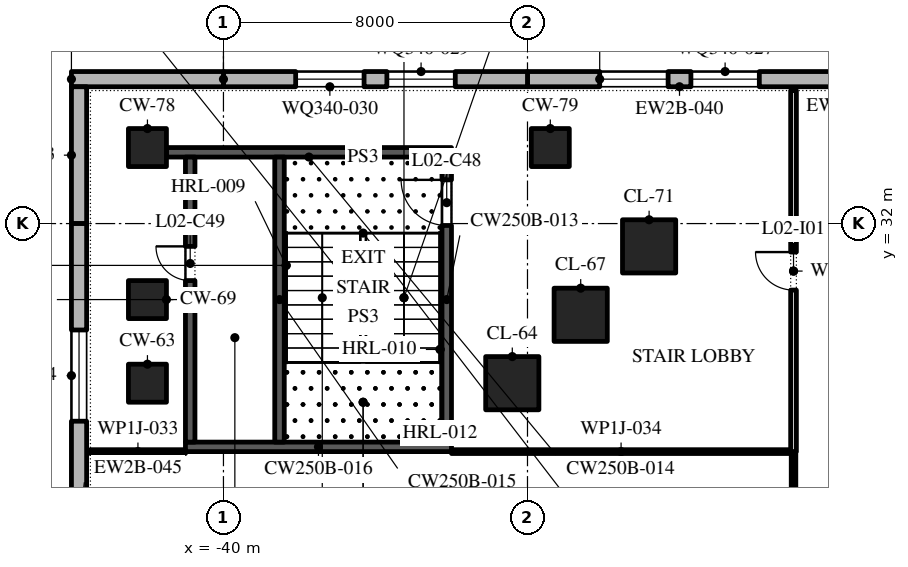
"""IFC4 building model, lengths in metres.
Left out: names, types, materials, properties, quantities, classifications, styles, units other than length and angle.
Written with IfcOpenShell. Run it as: python <this file> out.ifc"""

import sys

from ifc_helpers import new_model, si_unit, direction, frame, frame_2d, origin, origin_2d, place, context, subcontext, project, spatial, polyline, rectangle, outline, extrude, element, fill, save


model = new_model("IFC4")
c1 = context("Model", 3, precision=1e-05, world=origin(), true_north=direction((0.0, 1.0)))
c2 = subcontext(c1, "Body", "Model", "MODEL_VIEW")
j1 = project(units=[si_unit("LENGTHUNIT", "METRE"), si_unit("PLANEANGLEUNIT", "RADIAN")], contexts=[c1])
p1 = place(None, origin())
s1 = spatial("IfcSite", under=j1, at=p1, CompositionType="ELEMENT")
p2 = place(p1, origin())
s2 = spatial("IfcBuilding", under=s1, at=p2, CompositionType="ELEMENT")
p3 = place(p2, frame((0.0, 0.0, 14.0)))
s3 = spatial("IfcBuildingStorey", under=s2, at=p3, CompositionType="ELEMENT", Elevation=14.0)
p4 = place(p3, frame((-42.0, 27.8, 0.0), z_axis=(0.0, 0.0, 1.0), x_axis=(1.0, 0.0, 0.0)))
e1 = element("IfcColumn", 1, at=p4, inside=s3, PredefinedType="COLUMN", context=c2, shape_type="SweptSolid", body=[
    extrude(rectangle(XDim=1.0, YDim=1.0, at=origin_2d()), origin(), (0.0, 0.0, 1.0), 5.2),
])
for number, where, z_axis, x_axis in (
    (2, (-32.4, 27.8, 0.0), (0.0, 0.0, 1.0), (1.0, 0.0, 0.0)),
    (3, (-30.6, 29.6, 0.0), (0.0, 0.0, 1.0), (1.0, 0.0, 0.0)),
):
    element("IfcColumn", number, at=place(p3, frame(where, z_axis=z_axis, x_axis=x_axis)), inside=s3, PredefinedType="COLUMN", context=c2, shape_type="SweptSolid", body=[
        extrude(rectangle(XDim=1.4, YDim=1.4, at=origin_2d()), origin(), (0.0, 0.0, 1.0), 5.2),
    ])
p5 = place(p3, frame((-42.0, 30.0, 0.0), z_axis=(0.0, 0.0, 1.0), x_axis=(1.0, 0.0, 0.0)))
e4 = element("IfcColumn", 4, at=p5, inside=s3, PredefinedType="COLUMN", context=c2, shape_type="SweptSolid", body=[
    extrude(rectangle(XDim=1.0, YDim=1.0, at=origin_2d()), origin(), (0.0, 0.0, 1.0), 5.2),
])
p6 = place(p3, frame((-28.8, 31.4, 0.0), z_axis=(0.0, 0.0, 1.0), x_axis=(1.0, 0.0, 0.0)))
e5 = element("IfcColumn", 5, at=p6, inside=s3, PredefinedType="COLUMN", context=c2, shape_type="SweptSolid", body=[
    extrude(rectangle(XDim=1.4, YDim=1.4, at=origin_2d()), origin(), (0.0, 0.0, 1.0), 5.2),
])
for number, where, z_axis, x_axis in (
    (6, (-42.0, 34.0, 0.0), (0.0, 0.0, 1.0), (1.0, 0.0, 0.0)),
    (7, (-31.4, 34.0, 0.0), (0.0, 0.0, 1.0), (1.0, 0.0, 0.0)),
):
    element("IfcColumn", number, at=place(p3, frame(where, z_axis=z_axis, x_axis=x_axis)), inside=s3, PredefinedType="COLUMN", context=c2, shape_type="SweptSolid", body=[
        extrude(rectangle(XDim=1.0, YDim=1.0, at=origin_2d()), origin(), (0.0, 0.0, 1.0), 5.2),
    ])
p7 = place(p3, frame((-24.0, 35.8, 0.0), z_axis=(0.0, 0.0, 1.0), x_axis=(-1.0, 0.0, 0.0)))
e8 = element("IfcWall", 8, at=p7, inside=s3, PredefinedType="STANDARD", context=c2, shape_type="SweptSolid", body=[
    extrude(rectangle(XDim=8.0, YDim=0.4, at=frame_2d((4.0, 0.0))), origin(), (0.0, 0.0, 1.0), 4.9),
])
p8 = place(p7, frame((1.9, 0.0, 0.9)))
e9 = element("IfcOpeningElement", 9, at=p8, cuts=e8, PredefinedType="OPENING", context=c2, shape_type="SweptSolid", body=[
    extrude(outline(polyline([(0.0, 0.0), (1.8, 0.0), (1.8, 1.841), (1.785, 2.076), (1.739, 2.307), (1.663, 2.53), (1.559, 2.741), (1.428, 2.937), (1.273, 3.114), (1.096, 3.269), (0.9, 3.4), (0.704, 3.269), (0.527, 3.114), (0.372, 2.937), (0.241, 2.741), (0.137, 2.53), (0.061, 2.307), (0.015, 2.076), (0.0, 1.841), (0.0, 0.0)])), frame((0.0, 0.21, 0.0), z_axis=(0.0, -1.0, 0.0), x_axis=(1.0, 0.0, 0.0)), (0.0, 0.0, 1.0), 0.42),
])
p9 = place(p7, frame((4.3, 0.0, 0.9)))
e10 = element("IfcOpeningElement", 10, at=p9, cuts=e8, PredefinedType="OPENING", context=c2, shape_type="SweptSolid", body=[
    extrude(outline(polyline([(0.0, 0.0), (1.8, 0.0), (1.8, 1.841), (1.785, 2.076), (1.739, 2.307), (1.663, 2.53), (1.559, 2.741), (1.428, 2.937), (1.273, 3.114), (1.096, 3.269), (0.9, 3.4), (0.704, 3.269), (0.527, 3.114), (0.372, 2.937), (0.241, 2.741), (0.137, 2.53), (0.061, 2.307), (0.015, 2.076), (0.0, 1.841), (0.0, 0.0)])), frame((0.0, 0.21, 0.0), z_axis=(0.0, -1.0, 0.0), x_axis=(1.0, 0.0, 0.0)), (0.0, 0.0, 1.0), 0.42),
])
p10 = place(p3, frame((-32.0, 35.8, 0.0), z_axis=(0.0, 0.0, 1.0), x_axis=(-1.0, 0.0, 0.0)))
e11 = element("IfcWall", 11, at=p10, inside=s3, PredefinedType="STANDARD", context=c2, shape_type="SweptSolid", body=[
    extrude(rectangle(XDim=8.0, YDim=0.4, at=frame_2d((4.0, 0.0))), origin(), (0.0, 0.0, 1.0), 4.9),
])
p11 = place(p10, frame((1.9, 0.0, 0.9)))
e12 = element("IfcOpeningElement", 12, at=p11, cuts=e11, PredefinedType="OPENING", context=c2, shape_type="SweptSolid", body=[
    extrude(outline(polyline([(0.0, 0.0), (1.8, 0.0), (1.8, 1.841), (1.785, 2.076), (1.739, 2.307), (1.663, 2.53), (1.559, 2.741), (1.428, 2.937), (1.273, 3.114), (1.096, 3.269), (0.9, 3.4), (0.704, 3.269), (0.527, 3.114), (0.372, 2.937), (0.241, 2.741), (0.137, 2.53), (0.061, 2.307), (0.015, 2.076), (0.0, 1.841), (0.0, 0.0)])), frame((0.0, 0.21, 0.0), z_axis=(0.0, -1.0, 0.0), x_axis=(1.0, 0.0, 0.0)), (0.0, 0.0, 1.0), 0.42),
])
p12 = place(p10, frame((4.3, 0.0, 0.9)))
e13 = element("IfcOpeningElement", 13, at=p12, cuts=e11, PredefinedType="OPENING", context=c2, shape_type="SweptSolid", body=[
    extrude(outline(polyline([(0.0, 0.0), (1.8, 0.0), (1.8, 1.841), (1.785, 2.076), (1.739, 2.307), (1.663, 2.53), (1.559, 2.741), (1.428, 2.937), (1.273, 3.114), (1.096, 3.269), (0.9, 3.4), (0.704, 3.269), (0.527, 3.114), (0.372, 2.937), (0.241, 2.741), (0.137, 2.53), (0.061, 2.307), (0.015, 2.076), (0.0, 1.841), (0.0, 0.0)])), frame((0.0, 0.21, 0.0), z_axis=(0.0, -1.0, 0.0), x_axis=(1.0, 0.0, 0.0)), (0.0, 0.0, 1.0), 0.42),
])
p13 = place(p3, frame((-40.0, 35.8, 0.0), z_axis=(0.0, 0.0, 1.0), x_axis=(-1.0, 0.0, 0.0)))
e14 = element("IfcWall", 14, at=p13, inside=s3, PredefinedType="STANDARD", context=c2, shape_type="SweptSolid", body=[
    extrude(rectangle(XDim=4.0, YDim=0.4, at=frame_2d((2.0, 0.0))), origin(), (0.0, 0.0, 1.0), 4.9),
])
p14 = place(p3, frame((-43.8, 35.6, 0.0), z_axis=(0.0, 0.0, 1.0), x_axis=(0.0, -1.0, 0.0)))
e15 = element("IfcWall", 15, at=p14, inside=s3, PredefinedType="STANDARD", context=c2, shape_type="SweptSolid", body=[
    extrude(rectangle(XDim=3.6, YDim=0.4, at=frame_2d((1.8, 0.0))), origin(), (0.0, 0.0, 1.0), 4.9),
])
p15 = place(p3, frame((-43.8, 32.0, 0.0), z_axis=(0.0, 0.0, 1.0), x_axis=(0.0, -1.0, 0.0)))
e16 = element("IfcWall", 16, at=p15, inside=s3, PredefinedType="STANDARD", context=c2, shape_type="SweptSolid", body=[
    extrude(rectangle(XDim=8.0, YDim=0.4, at=frame_2d((4.0, 0.0))), origin(), (0.0, 0.0, 1.0), 4.9),
])
p16 = place(p15, frame((2.8, 0.0, 0.9)))
e17 = element("IfcOpeningElement", 17, at=p16, cuts=e16, PredefinedType="OPENING", context=c2, shape_type="SweptSolid", body=[
    extrude(outline(polyline([(0.0, 0.0), (2.4, 0.0), (2.4, 1.7), (2.379, 1.976), (2.315, 2.246), (2.212, 2.502), (2.07, 2.74), (1.893, 2.954), (1.686, 3.137), (1.453, 3.287), (1.2, 3.4), (0.947, 3.287), (0.714, 3.137), (0.507, 2.954), (0.33, 2.74), (0.188, 2.502), (0.084, 2.246), (0.021, 1.976), (0.0, 1.7), (0.0, 0.0)])), frame((0.0, 0.21, 0.0), z_axis=(0.0, -1.0, 0.0), x_axis=(1.0, 0.0, 0.0)), (0.0, 0.0, 1.0), 0.42),
])
p17 = place(p3, frame((-41.0, 26.125, 0.0), z_axis=(0.0, 0.0, 1.0), x_axis=(1.0, 0.0, 0.0)))
e18 = element("IfcWall", 18, at=p17, inside=s3, PredefinedType="SHEAR", context=c2, shape_type="SweptSolid", body=[
    extrude(rectangle(XDim=7.0, YDim=0.25, at=frame_2d((3.5, 0.0))), origin(), (0.0, 0.0, 1.0), 4.9),
])
p18 = place(p3, frame((-41.5, 33.875, 0.0), z_axis=(0.0, 0.0, 1.0), x_axis=(1.0, 0.0, 0.0)))
e19 = element("IfcWall", 19, at=p18, inside=s3, PredefinedType="SHEAR", context=c2, shape_type="SweptSolid", body=[
    extrude(rectangle(XDim=7.5, YDim=0.25, at=frame_2d((3.75, 0.0))), origin(), (0.0, 0.0, 1.0), 4.9),
])
p19 = place(p3, frame((-40.875, 26.25, 0.0), z_axis=(0.0, 0.0, 1.0), x_axis=(0.0, 1.0, 0.0)))
e20 = element("IfcWall", 20, at=p19, inside=s3, PredefinedType="SHEAR", context=c2, shape_type="SweptSolid", body=[
    extrude(rectangle(XDim=7.5, YDim=0.25, at=frame_2d((3.75, 0.0))), origin(), (0.0, 0.0, 1.0), 4.9),
])
p20 = place(p19, frame((4.25, 0.0, 0.0)))
e21 = element("IfcOpeningElement", 21, at=p20, cuts=e20, PredefinedType="OPENING", context=c2, shape_type="SweptSolid", body=[
    extrude(rectangle(XDim=0.9, YDim=2.1, at=frame_2d((0.45, 1.05))), frame((0.0, 0.135, 0.0), z_axis=(0.0, -1.0, 0.0), x_axis=(1.0, 0.0, 0.0)), (0.0, 0.0, 1.0), 0.27),
])
p21 = place(p3, frame((-34.125, 26.25, 0.0), z_axis=(0.0, 0.0, 1.0), x_axis=(0.0, 1.0, 0.0)))
e22 = element("IfcWall", 22, at=p21, inside=s3, PredefinedType="SHEAR", context=c2, shape_type="SweptSolid", body=[
    extrude(rectangle(XDim=7.5, YDim=0.25, at=frame_2d((3.75, 0.0))), origin(), (0.0, 0.0, 1.0), 4.9),
])
p22 = place(p21, frame((5.7, 0.0, 0.0)))
e23 = element("IfcOpeningElement", 23, at=p22, cuts=e22, PredefinedType="OPENING", context=c2, shape_type="SweptSolid", body=[
    extrude(rectangle(XDim=1.2, YDim=2.1, at=frame_2d((0.6, 1.05))), frame((0.0, 0.135, 0.0), z_axis=(0.0, -1.0, 0.0), x_axis=(1.0, 0.0, 0.0)), (0.0, 0.0, 1.0), 0.27),
])
p23 = place(p3, frame((-38.525, 26.25, 0.0), z_axis=(0.0, 0.0, 1.0), x_axis=(0.0, 1.0, 0.0)))
e24 = element("IfcWall", 24, at=p23, inside=s3, PredefinedType="SHEAR", context=c2, shape_type="SweptSolid", body=[
    extrude(rectangle(XDim=7.5, YDim=0.25, at=frame_2d((3.75, 0.0))), origin(), (0.0, 0.0, 1.0), 4.9),
])
p24 = place(p3, frame((-43.5, 26.0, 0.0), z_axis=(0.0, 0.0, 1.0), x_axis=(1.0, 0.0, 0.0)))
e25 = element("IfcWall", 25, at=p24, inside=s3, PredefinedType="PARTITIONING", context=c2, shape_type="SweptSolid", body=[
    extrude(rectangle(XDim=2.5, YDim=0.1, at=frame_2d((1.25, 0.0))), origin(), (0.0, 0.0, 1.0), 4.9),
])
p25 = place(p3, frame((-34.0, 26.0, 0.0), z_axis=(0.0, 0.0, 1.0), x_axis=(1.0, 0.0, 0.0)))
e26 = element("IfcWall", 26, at=p25, inside=s3, PredefinedType="PARTITIONING", context=c2, shape_type="SweptSolid", body=[
    extrude(rectangle(XDim=8.925, YDim=0.1, at=frame_2d((4.462, 0.0))), origin(), (0.0, 0.0, 1.0), 4.9),
])
p26 = place(p3, frame((-25.0, 14.0, 0.0), z_axis=(0.0, 0.0, 1.0), x_axis=(0.0, 1.0, 0.0)))
e27 = element("IfcWall", 27, at=p26, inside=s3, PredefinedType="PARTITIONING", context=c2, shape_type="SweptSolid", body=[
    extrude(rectangle(XDim=12.0, YDim=0.12, at=frame_2d((6.0, 0.0))), origin(), (0.0, 0.0, 1.0), 4.9),
])
p27 = place(p26, frame((5.1, 0.0, 0.0)))
e28 = element("IfcOpeningElement", 28, at=p27, cuts=e27, PredefinedType="OPENING", context=c2, shape_type="SweptSolid", body=[
    extrude(rectangle(XDim=1.8, YDim=2.1, at=frame_2d((0.9, 1.05))), frame((0.0, 0.07, 0.0), z_axis=(0.0, -1.0, 0.0), x_axis=(1.0, 0.0, 0.0)), (0.0, 0.0, 1.0), 0.14),
])
p28 = place(p3, frame((-25.0, 26.0, 0.0), z_axis=(0.0, 0.0, 1.0), x_axis=(0.0, 1.0, 0.0)))
e29 = element("IfcWall", 29, at=p28, inside=s3, PredefinedType="PARTITIONING", context=c2, shape_type="SweptSolid", body=[
    extrude(rectangle(XDim=9.5, YDim=0.15, at=frame_2d((4.75, 0.0))), origin(), (0.0, 0.0, 1.0), 4.9),
])
p29 = place(p28, frame((4.25, 0.0, 0.0)))
e30 = element("IfcOpeningElement", 30, at=p29, cuts=e29, PredefinedType="OPENING", context=c2, shape_type="SweptSolid", body=[
    extrude(rectangle(XDim=1.0, YDim=2.1, at=frame_2d((0.5, 1.05))), frame((0.0, 0.085, 0.0), z_axis=(0.0, -1.0, 0.0), x_axis=(1.0, 0.0, 0.0)), (0.0, 0.0, 1.0), 0.17),
])
p30 = place(p8, origin())
e31 = element("IfcWindow", 31, at=p30, inside=s3, PartitioningType="DOUBLE_PANEL_VERTICAL", PredefinedType="WINDOW", context=c2, shape_type="SweptSolid", body=[
    extrude(outline(polyline([(0.0, 0.0), (1.8, 0.0), (1.8, 1.841), (1.785, 2.076), (1.739, 2.307), (1.663, 2.53), (1.559, 2.741), (1.428, 2.937), (1.273, 3.114), (1.096, 3.269), (0.9, 3.4), (0.704, 3.269), (0.527, 3.114), (0.372, 2.937), (0.241, 2.741), (0.137, 2.53), (0.061, 2.307), (0.015, 2.076), (0.0, 1.841), (0.0, 0.0)])), frame((0.0, 0.03, 0.0), z_axis=(0.0, -1.0, 0.0), x_axis=(1.0, 0.0, 0.0)), (0.0, 0.0, 1.0), 0.06),
])
fill(e9, e31)
p31 = place(p9, origin())
e32 = element("IfcWindow", 32, at=p31, inside=s3, PartitioningType="DOUBLE_PANEL_VERTICAL", PredefinedType="WINDOW", context=c2, shape_type="SweptSolid", body=[
    extrude(outline(polyline([(0.0, 0.0), (1.8, 0.0), (1.8, 1.841), (1.785, 2.076), (1.739, 2.307), (1.663, 2.53), (1.559, 2.741), (1.428, 2.937), (1.273, 3.114), (1.096, 3.269), (0.9, 3.4), (0.704, 3.269), (0.527, 3.114), (0.372, 2.937), (0.241, 2.741), (0.137, 2.53), (0.061, 2.307), (0.015, 2.076), (0.0, 1.841), (0.0, 0.0)])), frame((0.0, 0.03, 0.0), z_axis=(0.0, -1.0, 0.0), x_axis=(1.0, 0.0, 0.0)), (0.0, 0.0, 1.0), 0.06),
])
fill(e10, e32)
p32 = place(p11, origin())
e33 = element("IfcWindow", 33, at=p32, inside=s3, PartitioningType="DOUBLE_PANEL_VERTICAL", PredefinedType="WINDOW", context=c2, shape_type="SweptSolid", body=[
    extrude(outline(polyline([(0.0, 0.0), (1.8, 0.0), (1.8, 1.841), (1.785, 2.076), (1.739, 2.307), (1.663, 2.53), (1.559, 2.741), (1.428, 2.937), (1.273, 3.114), (1.096, 3.269), (0.9, 3.4), (0.704, 3.269), (0.527, 3.114), (0.372, 2.937), (0.241, 2.741), (0.137, 2.53), (0.061, 2.307), (0.015, 2.076), (0.0, 1.841), (0.0, 0.0)])), frame((0.0, 0.03, 0.0), z_axis=(0.0, -1.0, 0.0), x_axis=(1.0, 0.0, 0.0)), (0.0, 0.0, 1.0), 0.06),
])
fill(e12, e33)
p33 = place(p12, origin())
e34 = element("IfcWindow", 34, at=p33, inside=s3, PartitioningType="DOUBLE_PANEL_VERTICAL", PredefinedType="WINDOW", context=c2, shape_type="SweptSolid", body=[
    extrude(outline(polyline([(0.0, 0.0), (1.8, 0.0), (1.8, 1.841), (1.785, 2.076), (1.739, 2.307), (1.663, 2.53), (1.559, 2.741), (1.428, 2.937), (1.273, 3.114), (1.096, 3.269), (0.9, 3.4), (0.704, 3.269), (0.527, 3.114), (0.372, 2.937), (0.241, 2.741), (0.137, 2.53), (0.061, 2.307), (0.015, 2.076), (0.0, 1.841), (0.0, 0.0)])), frame((0.0, 0.03, 0.0), z_axis=(0.0, -1.0, 0.0), x_axis=(1.0, 0.0, 0.0)), (0.0, 0.0, 1.0), 0.06),
])
fill(e13, e34)
p34 = place(p16, origin())
e35 = element("IfcWindow", 35, at=p34, inside=s3, PartitioningType="DOUBLE_PANEL_VERTICAL", PredefinedType="WINDOW", context=c2, shape_type="SweptSolid", body=[
    extrude(outline(polyline([(0.0, 0.0), (2.4, 0.0), (2.4, 1.7), (2.379, 1.976), (2.315, 2.246), (2.212, 2.502), (2.07, 2.74), (1.893, 2.954), (1.686, 3.137), (1.453, 3.287), (1.2, 3.4), (0.947, 3.287), (0.714, 3.137), (0.507, 2.954), (0.33, 2.74), (0.188, 2.502), (0.084, 2.246), (0.021, 1.976), (0.0, 1.7), (0.0, 0.0)])), frame((0.0, 0.03, 0.0), z_axis=(0.0, -1.0, 0.0), x_axis=(1.0, 0.0, 0.0)), (0.0, 0.0, 1.0), 0.06),
])
fill(e17, e35)
p35 = place(p22, origin())
e36 = element("IfcDoor", 36, at=p35, inside=s3, OperationType="SINGLE_SWING_LEFT", PredefinedType="DOOR", context=c2, shape_type="SweptSolid", body=[
    extrude(rectangle(XDim=1.2, YDim=2.1, at=frame_2d((0.6, 1.05))), frame((0.0, 0.025, 0.0), z_axis=(0.0, -1.0, 0.0), x_axis=(1.0, 0.0, 0.0)), (0.0, 0.0, 1.0), 0.05),
])
fill(e23, e36)
p36 = place(p20, origin())
e37 = element("IfcDoor", 37, at=p36, inside=s3, OperationType="SINGLE_SWING_LEFT", PredefinedType="DOOR", context=c2, shape_type="SweptSolid", body=[
    extrude(rectangle(XDim=0.9, YDim=2.1, at=frame_2d((0.45, 1.05))), frame((0.0, -0.075, 0.0), z_axis=(0.0, -1.0, 0.0), x_axis=(1.0, 0.0, 0.0)), (0.0, 0.0, 1.0), 0.05),
])
fill(e21, e37)
p37 = place(p29, origin())
e38 = element("IfcDoor", 38, at=p37, inside=s3, OperationType="SINGLE_SWING_LEFT", PredefinedType="DOOR", context=c2, shape_type="SweptSolid", body=[
    extrude(rectangle(XDim=1.0, YDim=2.1, at=frame_2d((0.5, 1.05))), frame((0.0, 0.025, 0.0), z_axis=(0.0, -1.0, 0.0), x_axis=(1.0, 0.0, 0.0)), (0.0, 0.0, 1.0), 0.05),
])
fill(e30, e38)
save(model, sys.argv[1])
